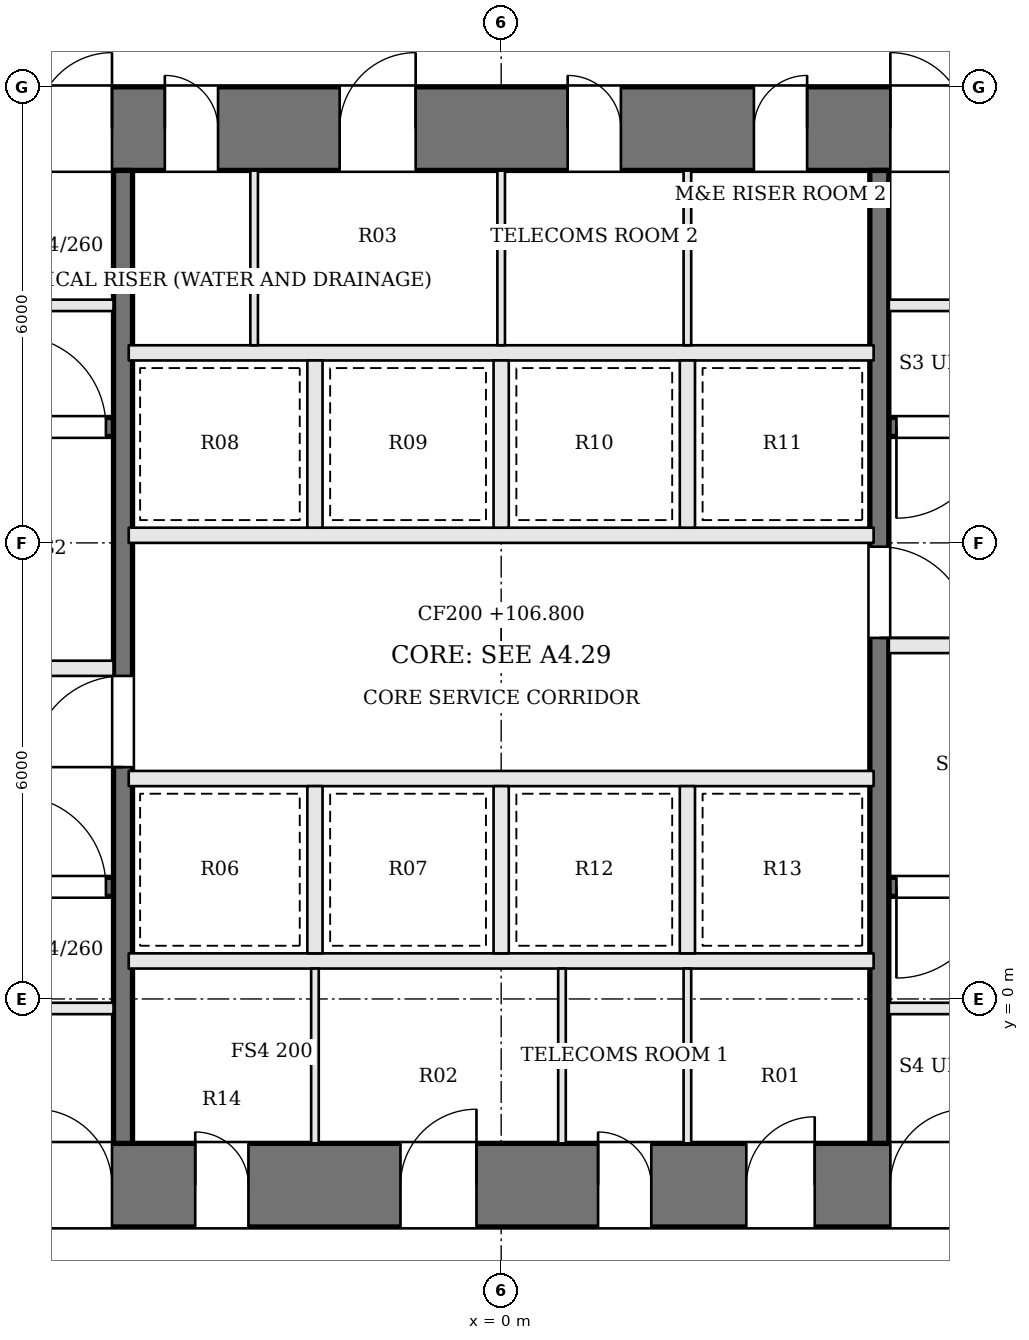
"""IFC4 building model, lengths in metres.
Left out: names, types, materials, properties, quantities, classifications, styles, units other than length and angle.
Written with IfcOpenShell. Run it as: python <this file> out.ifc"""

import sys

from ifc_helpers import new_model, si_unit, direction, frame, frame_2d, origin, place, context, subcontext, project, spatial, rectangle, extrude, element, fill, save


model = new_model("IFC4")
c1 = context("Model", 3, precision=1e-05, world=origin(), true_north=direction((0.0, 1.0)))
c2 = subcontext(c1, "Body", "Model", "MODEL_VIEW")
j1 = project(units=[si_unit("LENGTHUNIT", "METRE"), si_unit("PLANEANGLEUNIT", "RADIAN")], contexts=[c1])
p1 = place(None, origin())
s1 = spatial("IfcSite", under=j1, at=p1, CompositionType="ELEMENT")
p2 = place(p1, origin())
s2 = spatial("IfcBuilding", under=s1, at=p2, CompositionType="ELEMENT")
p3 = place(p2, frame((0.0, 0.0, 106.8)))
s3 = spatial("IfcBuildingStorey", under=s2, at=p3, CompositionType="ELEMENT", Elevation=106.8)
p4 = place(p3, frame((-13.0, 11.45, 0.0), z_axis=(0.0, 0.0, 1.0), x_axis=(1.0, 0.0, 0.0)))
e1 = element("IfcWall", 1, at=p4, inside=s3, PredefinedType="SHEAR", context=c2, shape_type="SweptSolid", body=[
    extrude(rectangle(XDim=26.0, YDim=1.1, at=frame_2d((13.0, 0.0))), origin(), (0.0, 0.0, 1.0), 3.6),
])
p5 = place(p4, frame((8.575, 0.0, 0.0)))
e2 = element("IfcOpeningElement", 2, at=p5, cuts=e1, PredefinedType="OPENING", context=c2, shape_type="SweptSolid", body=[
    extrude(rectangle(XDim=0.7, YDim=2.1, at=frame_2d((0.35, 1.05))), frame((0.0, 0.56, 0.0), z_axis=(0.0, -1.0, 0.0), x_axis=(1.0, 0.0, 0.0)), (0.0, 0.0, 1.0), 1.12),
])
p6 = place(p4, frame((10.875, 0.0, 0.0)))
e3 = element("IfcOpeningElement", 3, at=p6, cuts=e1, PredefinedType="OPENING", context=c2, shape_type="SweptSolid", body=[
    extrude(rectangle(XDim=1.0, YDim=2.1, at=frame_2d((0.5, 1.05))), frame((0.0, 0.56, 0.0), z_axis=(0.0, -1.0, 0.0), x_axis=(1.0, 0.0, 0.0)), (0.0, 0.0, 1.0), 1.12),
])
p7 = place(p4, frame((13.875, 0.0, 0.0)))
e4 = element("IfcOpeningElement", 4, at=p7, cuts=e1, PredefinedType="OPENING", context=c2, shape_type="SweptSolid", body=[
    extrude(rectangle(XDim=0.7, YDim=2.1, at=frame_2d((0.35, 1.05))), frame((0.0, 0.56, 0.0), z_axis=(0.0, -1.0, 0.0), x_axis=(1.0, 0.0, 0.0)), (0.0, 0.0, 1.0), 1.12),
])
p8 = place(p4, frame((16.325, 0.0, 0.0)))
e5 = element("IfcOpeningElement", 5, at=p8, cuts=e1, PredefinedType="OPENING", context=c2, shape_type="SweptSolid", body=[
    extrude(rectangle(XDim=0.7, YDim=2.1, at=frame_2d((0.35, 1.05))), frame((0.0, 0.56, 0.0), z_axis=(0.0, -1.0, 0.0), x_axis=(1.0, 0.0, 0.0)), (0.0, 0.0, 1.0), 1.12),
])
p9 = place(p4, frame((6.88, 0.0, 0.0)))
e6 = element("IfcOpeningElement", 6, at=p9, cuts=e1, PredefinedType="OPENING", context=c2, shape_type="SweptSolid", body=[
    extrude(rectangle(XDim=1.0, YDim=2.1, at=frame_2d((0.5, 1.05))), frame((0.0, 0.56, 0.0), z_axis=(0.0, -1.0, 0.0), x_axis=(1.0, 0.0, 0.0)), (0.0, 0.0, 1.0), 1.12),
])
p10 = place(p4, frame((18.12, 0.0, 0.0)))
e7 = element("IfcOpeningElement", 7, at=p10, cuts=e1, PredefinedType="OPENING", context=c2, shape_type="SweptSolid", body=[
    extrude(rectangle(XDim=1.0, YDim=2.1, at=frame_2d((0.5, 1.05))), frame((0.0, 0.56, 0.0), z_axis=(0.0, -1.0, 0.0), x_axis=(1.0, 0.0, 0.0)), (0.0, 0.0, 1.0), 1.12),
])
p11 = place(p3, frame((-13.0, -2.45, 0.0), z_axis=(0.0, 0.0, 1.0), x_axis=(1.0, 0.0, 0.0)))
e8 = element("IfcWall", 8, at=p11, inside=s3, PredefinedType="SHEAR", context=c2, shape_type="SweptSolid", body=[
    extrude(rectangle(XDim=26.0, YDim=1.1, at=frame_2d((13.0, 0.0))), origin(), (0.0, 0.0, 1.0), 3.6),
])
p12 = place(p11, frame((8.975, 0.0, 0.0)))
e9 = element("IfcOpeningElement", 9, at=p12, cuts=e8, PredefinedType="OPENING", context=c2, shape_type="SweptSolid", body=[
    extrude(rectangle(XDim=0.7, YDim=2.1, at=frame_2d((0.35, 1.05))), frame((0.0, 0.56, 0.0), z_axis=(0.0, -1.0, 0.0), x_axis=(1.0, 0.0, 0.0)), (0.0, 0.0, 1.0), 1.12),
])
p13 = place(p11, frame((11.675, 0.0, 0.0)))
e10 = element("IfcOpeningElement", 10, at=p13, cuts=e8, PredefinedType="OPENING", context=c2, shape_type="SweptSolid", body=[
    extrude(rectangle(XDim=1.0, YDim=2.1, at=frame_2d((0.5, 1.05))), frame((0.0, 0.56, 0.0), z_axis=(0.0, -1.0, 0.0), x_axis=(1.0, 0.0, 0.0)), (0.0, 0.0, 1.0), 1.12),
])
p14 = place(p11, frame((14.275, 0.0, 0.0)))
e11 = element("IfcOpeningElement", 11, at=p14, cuts=e8, PredefinedType="OPENING", context=c2, shape_type="SweptSolid", body=[
    extrude(rectangle(XDim=0.7, YDim=2.1, at=frame_2d((0.35, 1.05))), frame((0.0, 0.56, 0.0), z_axis=(0.0, -1.0, 0.0), x_axis=(1.0, 0.0, 0.0)), (0.0, 0.0, 1.0), 1.12),
])
p15 = place(p11, frame((16.225, 0.0, 0.0)))
e12 = element("IfcOpeningElement", 12, at=p15, cuts=e8, PredefinedType="OPENING", context=c2, shape_type="SweptSolid", body=[
    extrude(rectangle(XDim=0.9, YDim=2.1, at=frame_2d((0.45, 1.05))), frame((0.0, 0.56, 0.0), z_axis=(0.0, -1.0, 0.0), x_axis=(1.0, 0.0, 0.0)), (0.0, 0.0, 1.0), 1.12),
])
p16 = place(p11, frame((6.88, 0.0, 0.0)))
e13 = element("IfcOpeningElement", 13, at=p16, cuts=e8, PredefinedType="OPENING", context=c2, shape_type="SweptSolid", body=[
    extrude(rectangle(XDim=1.0, YDim=2.1, at=frame_2d((0.5, 1.05))), frame((0.0, 0.56, 0.0), z_axis=(0.0, -1.0, 0.0), x_axis=(1.0, 0.0, 0.0)), (0.0, 0.0, 1.0), 1.12),
])
p17 = place(p11, frame((18.12, 0.0, 0.0)))
e14 = element("IfcOpeningElement", 14, at=p17, cuts=e8, PredefinedType="OPENING", context=c2, shape_type="SweptSolid", body=[
    extrude(rectangle(XDim=1.0, YDim=2.1, at=frame_2d((0.5, 1.05))), frame((0.0, 0.56, 0.0), z_axis=(0.0, -1.0, 0.0), x_axis=(1.0, 0.0, 0.0)), (0.0, 0.0, 1.0), 1.12),
])
for number, where, z_axis, x_axis in (
    (15, (-6.4, -0.125, 0.0), (0.0, 0.0, 1.0), (1.0, 0.0, 0.0)),
    (16, (6.4, 9.125, 0.0), (0.0, 0.0, 1.0), (-1.0, 0.0, 0.0)),
    (17, (-6.4, 9.125, 0.0), (0.0, 0.0, 1.0), (1.0, 0.0, 0.0)),
    (18, (6.4, -0.125, 0.0), (0.0, 0.0, 1.0), (-1.0, 0.0, 0.0)),
):
    element("IfcWall", number, at=place(p3, frame(where, z_axis=z_axis, x_axis=x_axis)), inside=s3, PredefinedType="SOLIDWALL", context=c2, shape_type="SweptSolid", body=[
        extrude(rectangle(XDim=1.3, YDim=0.15, at=frame_2d((0.65, 0.0))), origin(), (0.0, 0.0, 1.0), 3.4),
    ])
p18 = place(p3, frame((-11.9, 1.475, 0.0), z_axis=(0.0, 0.0, 1.0), x_axis=(1.0, 0.0, 0.0)))
e19 = element("IfcWall", 19, at=p18, inside=s3, PredefinedType="SOLIDWALL", context=c2, shape_type="SweptSolid", body=[
    extrude(rectangle(XDim=6.8, YDim=0.25, at=frame_2d((3.4, 0.0))), origin(), (0.0, 0.0, 1.0), 3.4),
])
p19 = place(p18, frame((5.5, 0.0, 0.0)))
e20 = element("IfcOpeningElement", 20, at=p19, cuts=e19, PredefinedType="OPENING", context=c2, shape_type="SweptSolid", body=[
    extrude(rectangle(XDim=1.2, YDim=2.1, at=frame_2d((0.6, 1.05))), frame((0.0, 0.135, 0.0), z_axis=(0.0, -1.0, 0.0), x_axis=(1.0, 0.0, 0.0)), (0.0, 0.0, 1.0), 0.27),
])
p20 = place(p3, frame((11.9, 7.525, 0.0), z_axis=(0.0, 0.0, 1.0), x_axis=(-1.0, 0.0, 0.0)))
e21 = element("IfcWall", 21, at=p20, inside=s3, PredefinedType="SOLIDWALL", context=c2, shape_type="SweptSolid", body=[
    extrude(rectangle(XDim=6.8, YDim=0.25, at=frame_2d((3.4, 0.0))), origin(), (0.0, 0.0, 1.0), 3.4),
])
p21 = place(p20, frame((5.5, 0.0, 0.0)))
e22 = element("IfcOpeningElement", 22, at=p21, cuts=e21, PredefinedType="OPENING", context=c2, shape_type="SweptSolid", body=[
    extrude(rectangle(XDim=1.2, YDim=2.1, at=frame_2d((0.6, 1.05))), frame((0.0, 0.135, 0.0), z_axis=(0.0, -1.0, 0.0), x_axis=(1.0, 0.0, 0.0)), (0.0, 0.0, 1.0), 0.27),
])
p22 = place(p3, frame((-11.9, 4.35, 0.0), z_axis=(0.0, 0.0, 1.0), x_axis=(1.0, 0.0, 0.0)))
e23 = element("IfcWall", 23, at=p22, inside=s3, PredefinedType="SOLIDWALL", context=c2, shape_type="SweptSolid", body=[
    extrude(rectangle(XDim=6.8, YDim=0.2, at=frame_2d((3.4, 0.0))), origin(), (0.0, 0.0, 1.0), 3.4),
])
p23 = place(p22, frame((4.1, 0.0, 0.0)))
e24 = element("IfcOpeningElement", 24, at=p23, cuts=e23, PredefinedType="OPENING", context=c2, shape_type="SweptSolid", body=[
    extrude(rectangle(XDim=1.2, YDim=2.1, at=frame_2d((0.6, 1.05))), frame((0.0, 0.11, 0.0), z_axis=(0.0, -1.0, 0.0), x_axis=(1.0, 0.0, 0.0)), (0.0, 0.0, 1.0), 0.22),
])
p24 = place(p22, frame((0.8, 0.0, 0.0)))
e25 = element("IfcOpeningElement", 25, at=p24, cuts=e23, PredefinedType="OPENING", context=c2, shape_type="SweptSolid", body=[
    extrude(rectangle(XDim=1.2, YDim=2.1, at=frame_2d((0.6, 1.05))), frame((0.0, 0.11, 0.0), z_axis=(0.0, -1.0, 0.0), x_axis=(1.0, 0.0, 0.0)), (0.0, 0.0, 1.0), 0.22),
])
p25 = place(p3, frame((11.9, 4.65, 0.0), z_axis=(0.0, 0.0, 1.0), x_axis=(-1.0, 0.0, 0.0)))
e26 = element("IfcWall", 26, at=p25, inside=s3, PredefinedType="SOLIDWALL", context=c2, shape_type="SweptSolid", body=[
    extrude(rectangle(XDim=6.8, YDim=0.2, at=frame_2d((3.4, 0.0))), origin(), (0.0, 0.0, 1.0), 3.4),
])
p26 = place(p25, frame((4.1, 0.0, 0.0)))
e27 = element("IfcOpeningElement", 27, at=p26, cuts=e26, PredefinedType="OPENING", context=c2, shape_type="SweptSolid", body=[
    extrude(rectangle(XDim=1.2, YDim=2.1, at=frame_2d((0.6, 1.05))), frame((0.0, 0.11, 0.0), z_axis=(0.0, -1.0, 0.0), x_axis=(1.0, 0.0, 0.0)), (0.0, 0.0, 1.0), 0.22),
])
p27 = place(p25, frame((0.8, 0.0, 0.0)))
e28 = element("IfcOpeningElement", 28, at=p27, cuts=e26, PredefinedType="OPENING", context=c2, shape_type="SweptSolid", body=[
    extrude(rectangle(XDim=1.2, YDim=2.1, at=frame_2d((0.6, 1.05))), frame((0.0, 0.11, 0.0), z_axis=(0.0, -1.0, 0.0), x_axis=(1.0, 0.0, 0.0)), (0.0, 0.0, 1.0), 0.22),
])
p28 = place(p3, frame((-11.9, 7.525, 0.0), z_axis=(0.0, 0.0, 1.0), x_axis=(1.0, 0.0, 0.0)))
e29 = element("IfcWall", 29, at=p28, inside=s3, PredefinedType="SOLIDWALL", context=c2, shape_type="SweptSolid", body=[
    extrude(rectangle(XDim=6.8, YDim=0.25, at=frame_2d((3.4, 0.0))), origin(), (0.0, 0.0, 1.0), 3.4),
])
p29 = place(p28, frame((5.5, 0.0, 0.0)))
e30 = element("IfcOpeningElement", 30, at=p29, cuts=e29, PredefinedType="OPENING", context=c2, shape_type="SweptSolid", body=[
    extrude(rectangle(XDim=1.2, YDim=2.1, at=frame_2d((0.6, 1.05))), frame((0.0, 0.135, 0.0), z_axis=(0.0, -1.0, 0.0), x_axis=(1.0, 0.0, 0.0)), (0.0, 0.0, 1.0), 0.27),
])
p30 = place(p3, frame((11.9, 1.475, 0.0), z_axis=(0.0, 0.0, 1.0), x_axis=(-1.0, 0.0, 0.0)))
e31 = element("IfcWall", 31, at=p30, inside=s3, PredefinedType="SOLIDWALL", context=c2, shape_type="SweptSolid", body=[
    extrude(rectangle(XDim=6.8, YDim=0.25, at=frame_2d((3.4, 0.0))), origin(), (0.0, 0.0, 1.0), 3.4),
])
p31 = place(p30, frame((5.5, 0.0, 0.0)))
e32 = element("IfcOpeningElement", 32, at=p31, cuts=e31, PredefinedType="OPENING", context=c2, shape_type="SweptSolid", body=[
    extrude(rectangle(XDim=1.2, YDim=2.1, at=frame_2d((0.6, 1.05))), frame((0.0, 0.135, 0.0), z_axis=(0.0, -1.0, 0.0), x_axis=(1.0, 0.0, 0.0)), (0.0, 0.0, 1.0), 0.27),
])
p32 = place(p3, frame((-4.975, -1.9, 0.0), z_axis=(0.0, 0.0, 1.0), x_axis=(0.0, 1.0, 0.0)))
e33 = element("IfcWall", 33, at=p32, inside=s3, PredefinedType="SOLIDWALL", context=c2, shape_type="SweptSolid", body=[
    extrude(rectangle(XDim=12.8, YDim=0.25, at=frame_2d((6.4, 0.0))), origin(), (0.0, 0.0, 1.0), 3.4),
])
p33 = place(p32, frame((4.95, 0.0, 0.0)))
e34 = element("IfcOpeningElement", 34, at=p33, cuts=e33, PredefinedType="OPENING", context=c2, shape_type="SweptSolid", body=[
    extrude(rectangle(XDim=1.2, YDim=2.1, at=frame_2d((0.6, 1.05))), frame((0.0, 0.135, 0.0), z_axis=(0.0, -1.0, 0.0), x_axis=(1.0, 0.0, 0.0)), (0.0, 0.0, 1.0), 0.27),
])
p34 = place(p3, frame((4.975, 10.9, 0.0), z_axis=(0.0, 0.0, 1.0), x_axis=(0.0, -1.0, 0.0)))
e35 = element("IfcWall", 35, at=p34, inside=s3, PredefinedType="SOLIDWALL", context=c2, shape_type="SweptSolid", body=[
    extrude(rectangle(XDim=12.8, YDim=0.25, at=frame_2d((6.4, 0.0))), origin(), (0.0, 0.0, 1.0), 3.4),
])
p35 = place(p34, frame((4.95, 0.0, 0.0)))
e36 = element("IfcOpeningElement", 36, at=p35, cuts=e35, PredefinedType="OPENING", context=c2, shape_type="SweptSolid", body=[
    extrude(rectangle(XDim=1.2, YDim=2.1, at=frame_2d((0.6, 1.05))), frame((0.0, 0.135, 0.0), z_axis=(0.0, -1.0, 0.0), x_axis=(1.0, 0.0, 0.0)), (0.0, 0.0, 1.0), 0.27),
])
for number, where, z_axis, x_axis in (
    (37, (-4.9, 0.5, 0.0), (0.0, 0.0, 1.0), (1.0, 0.0, 0.0)),
    (38, (-4.9, 2.9, 0.0), (0.0, 0.0, 1.0), (1.0, 0.0, 0.0)),
    (39, (-4.9, 6.1, 0.0), (0.0, 0.0, 1.0), (1.0, 0.0, 0.0)),
    (40, (-4.9, 8.5, 0.0), (0.0, 0.0, 1.0), (1.0, 0.0, 0.0)),
):
    element("IfcWall", number, at=place(p3, frame(where, z_axis=z_axis, x_axis=x_axis)), inside=s3, PredefinedType="SOLIDWALL", context=c2, shape_type="SweptSolid", body=[
        extrude(rectangle(XDim=9.8, YDim=0.2, at=frame_2d((4.9, 0.0))), origin(), (0.0, 0.0, 1.0), 3.4),
    ])
for number, where, z_axis, x_axis in (
    (41, (-2.45, 0.6, 0.0), (0.0, 0.0, 1.0), (0.0, 1.0, 0.0)),
    (42, (0.0, 0.6, 0.0), (0.0, 0.0, 1.0), (0.0, 1.0, 0.0)),
    (43, (2.45, 0.6, 0.0), (0.0, 0.0, 1.0), (0.0, 1.0, 0.0)),
    (44, (-2.45, 6.2, 0.0), (0.0, 0.0, 1.0), (0.0, 1.0, 0.0)),
    (45, (0.0, 6.2, 0.0), (0.0, 0.0, 1.0), (0.0, 1.0, 0.0)),
    (46, (2.45, 6.2, 0.0), (0.0, 0.0, 1.0), (0.0, 1.0, 0.0)),
):
    element("IfcWall", number, at=place(p3, frame(where, z_axis=z_axis, x_axis=x_axis)), inside=s3, PredefinedType="SOLIDWALL", context=c2, shape_type="SweptSolid", body=[
        extrude(rectangle(XDim=2.2, YDim=0.2, at=frame_2d((1.1, 0.0))), origin(), (0.0, 0.0, 1.0), 3.4),
    ])
for number, where, z_axis, x_axis in (
    (47, (-2.45, -1.9, 0.0), (0.0, 0.0, 1.0), (0.0, 1.0, 0.0)),
    (48, (0.8, -1.9, 0.0), (0.0, 0.0, 1.0), (0.0, 1.0, 0.0)),
    (49, (2.45, -1.9, 0.0), (0.0, 0.0, 1.0), (0.0, 1.0, 0.0)),
    (50, (-3.25, 8.6, 0.0), (0.0, 0.0, 1.0), (0.0, 1.0, 0.0)),
    (51, (0.0, 8.6, 0.0), (0.0, 0.0, 1.0), (0.0, 1.0, 0.0)),
    (52, (2.45, 8.6, 0.0), (0.0, 0.0, 1.0), (0.0, 1.0, 0.0)),
):
    element("IfcWall", number, at=place(p3, frame(where, z_axis=z_axis, x_axis=x_axis)), inside=s3, PredefinedType="PARTITIONING", context=c2, shape_type="SweptSolid", body=[
        extrude(rectangle(XDim=2.3, YDim=0.1, at=frame_2d((1.15, 0.0))), origin(), (0.0, 0.0, 1.0), 3.4),
    ])
p36 = place(p33, origin())
e53 = element("IfcDoor", 53, at=p36, inside=s3, OperationType="SINGLE_SWING_LEFT", PredefinedType="DOOR", context=c2, shape_type="SweptSolid", body=[
    extrude(rectangle(XDim=1.2, YDim=2.1, at=frame_2d((0.6, 1.05))), frame((0.0, 0.025, 0.0), z_axis=(0.0, -1.0, 0.0), x_axis=(1.0, 0.0, 0.0)), (0.0, 0.0, 1.0), 0.05),
])
fill(e34, e53)
p37 = place(p35, origin())
e54 = element("IfcDoor", 54, at=p37, inside=s3, OperationType="SINGLE_SWING_RIGHT", PredefinedType="DOOR", context=c2, shape_type="SweptSolid", body=[
    extrude(rectangle(XDim=1.2, YDim=2.1, at=frame_2d((0.6, 1.05))), frame((0.0, 0.025, 0.0), z_axis=(0.0, -1.0, 0.0), x_axis=(1.0, 0.0, 0.0)), (0.0, 0.0, 1.0), 0.05),
])
fill(e36, e54)
p38 = place(p19, origin())
e55 = element("IfcDoor", 55, at=p38, inside=s3, OperationType="SINGLE_SWING_LEFT", PredefinedType="DOOR", context=c2, shape_type="SweptSolid", body=[
    extrude(rectangle(XDim=1.2, YDim=2.1, at=frame_2d((0.6, 1.05))), frame((0.0, 0.025, 0.0), z_axis=(0.0, -1.0, 0.0), x_axis=(1.0, 0.0, 0.0)), (0.0, 0.0, 1.0), 0.05),
])
fill(e20, e55)
p39 = place(p21, origin())
e56 = element("IfcDoor", 56, at=p39, inside=s3, OperationType="SINGLE_SWING_RIGHT", PredefinedType="DOOR", context=c2, shape_type="SweptSolid", body=[
    extrude(rectangle(XDim=1.2, YDim=2.1, at=frame_2d((0.6, 1.05))), frame((0.0, 0.025, 0.0), z_axis=(0.0, -1.0, 0.0), x_axis=(1.0, 0.0, 0.0)), (0.0, 0.0, 1.0), 0.05),
])
fill(e22, e56)
p40 = place(p29, origin())
e57 = element("IfcDoor", 57, at=p40, inside=s3, OperationType="SINGLE_SWING_LEFT", PredefinedType="DOOR", context=c2, shape_type="SweptSolid", body=[
    extrude(rectangle(XDim=1.2, YDim=2.1, at=frame_2d((0.6, 1.05))), frame((0.0, 0.025, 0.0), z_axis=(0.0, -1.0, 0.0), x_axis=(1.0, 0.0, 0.0)), (0.0, 0.0, 1.0), 0.05),
])
fill(e30, e57)
p41 = place(p31, origin())
e58 = element("IfcDoor", 58, at=p41, inside=s3, OperationType="SINGLE_SWING_RIGHT", PredefinedType="DOOR", context=c2, shape_type="SweptSolid", body=[
    extrude(rectangle(XDim=1.2, YDim=2.1, at=frame_2d((0.6, 1.05))), frame((0.0, 0.025, 0.0), z_axis=(0.0, -1.0, 0.0), x_axis=(1.0, 0.0, 0.0)), (0.0, 0.0, 1.0), 0.05),
])
fill(e32, e58)
p42 = place(p12, origin())
e59 = element("IfcDoor", 59, at=p42, inside=s3, OperationType="SINGLE_SWING_LEFT", PredefinedType="DOOR", context=c2, shape_type="SweptSolid", body=[
    extrude(rectangle(XDim=0.7, YDim=2.1, at=frame_2d((0.35, 1.05))), frame((0.0, 0.025, 0.0), z_axis=(0.0, -1.0, 0.0), x_axis=(1.0, 0.0, 0.0)), (0.0, 0.0, 1.0), 0.05),
])
fill(e9, e59)
p43 = place(p13, origin())
e60 = element("IfcDoor", 60, at=p43, inside=s3, OperationType="SINGLE_SWING_RIGHT", PredefinedType="DOOR", context=c2, shape_type="SweptSolid", body=[
    extrude(rectangle(XDim=1.0, YDim=2.1, at=frame_2d((0.5, 1.05))), frame((0.0, 0.025, 0.0), z_axis=(0.0, -1.0, 0.0), x_axis=(1.0, 0.0, 0.0)), (0.0, 0.0, 1.0), 0.05),
])
fill(e10, e60)
p44 = place(p14, origin())
e61 = element("IfcDoor", 61, at=p44, inside=s3, OperationType="SINGLE_SWING_LEFT", PredefinedType="DOOR", context=c2, shape_type="SweptSolid", body=[
    extrude(rectangle(XDim=0.7, YDim=2.1, at=frame_2d((0.35, 1.05))), frame((0.0, 0.025, 0.0), z_axis=(0.0, -1.0, 0.0), x_axis=(1.0, 0.0, 0.0)), (0.0, 0.0, 1.0), 0.05),
])
fill(e11, e61)
p45 = place(p15, origin())
e62 = element("IfcDoor", 62, at=p45, inside=s3, OperationType="SINGLE_SWING_RIGHT", PredefinedType="DOOR", context=c2, shape_type="SweptSolid", body=[
    extrude(rectangle(XDim=0.9, YDim=2.1, at=frame_2d((0.45, 1.05))), frame((0.0, 0.025, 0.0), z_axis=(0.0, -1.0, 0.0), x_axis=(1.0, 0.0, 0.0)), (0.0, 0.0, 1.0), 0.05),
])
fill(e12, e62)
p46 = place(p5, origin())
e63 = element("IfcDoor", 63, at=p46, inside=s3, OperationType="SINGLE_SWING_LEFT", PredefinedType="DOOR", context=c2, shape_type="SweptSolid", body=[
    extrude(rectangle(XDim=0.7, YDim=2.1, at=frame_2d((0.35, 1.05))), frame((0.0, 0.025, 0.0), z_axis=(0.0, -1.0, 0.0), x_axis=(1.0, 0.0, 0.0)), (0.0, 0.0, 1.0), 0.05),
])
fill(e2, e63)
p47 = place(p6, origin())
e64 = element("IfcDoor", 64, at=p47, inside=s3, OperationType="SINGLE_SWING_RIGHT", PredefinedType="DOOR", context=c2, shape_type="SweptSolid", body=[
    extrude(rectangle(XDim=1.0, YDim=2.1, at=frame_2d((0.5, 1.05))), frame((0.0, 0.025, 0.0), z_axis=(0.0, -1.0, 0.0), x_axis=(1.0, 0.0, 0.0)), (0.0, 0.0, 1.0), 0.05),
])
fill(e3, e64)
p48 = place(p7, origin())
e65 = element("IfcDoor", 65, at=p48, inside=s3, OperationType="SINGLE_SWING_LEFT", PredefinedType="DOOR", context=c2, shape_type="SweptSolid", body=[
    extrude(rectangle(XDim=0.7, YDim=2.1, at=frame_2d((0.35, 1.05))), frame((0.0, 0.025, 0.0), z_axis=(0.0, -1.0, 0.0), x_axis=(1.0, 0.0, 0.0)), (0.0, 0.0, 1.0), 0.05),
])
fill(e4, e65)
p49 = place(p8, origin())
e66 = element("IfcDoor", 66, at=p49, inside=s3, OperationType="SINGLE_SWING_RIGHT", PredefinedType="DOOR", context=c2, shape_type="SweptSolid", body=[
    extrude(rectangle(XDim=0.7, YDim=2.1, at=frame_2d((0.35, 1.05))), frame((0.0, 0.025, 0.0), z_axis=(0.0, -1.0, 0.0), x_axis=(1.0, 0.0, 0.0)), (0.0, 0.0, 1.0), 0.05),
])
fill(e5, e66)
p50 = place(p16, origin())
e67 = element("IfcDoor", 67, at=p50, inside=s3, OperationType="SINGLE_SWING_LEFT", PredefinedType="DOOR", context=c2, shape_type="SweptSolid", body=[
    extrude(rectangle(XDim=1.0, YDim=2.1, at=frame_2d((0.5, 1.05))), frame((0.0, 0.025, 0.0), z_axis=(0.0, -1.0, 0.0), x_axis=(1.0, 0.0, 0.0)), (0.0, 0.0, 1.0), 0.05),
])
fill(e13, e67)
p51 = place(p9, origin())
e68 = element("IfcDoor", 68, at=p51, inside=s3, OperationType="SINGLE_SWING_RIGHT", PredefinedType="DOOR", context=c2, shape_type="SweptSolid", body=[
    extrude(rectangle(XDim=1.0, YDim=2.1, at=frame_2d((0.5, 1.05))), frame((0.0, 0.025, 0.0), z_axis=(0.0, -1.0, 0.0), x_axis=(1.0, 0.0, 0.0)), (0.0, 0.0, 1.0), 0.05),
])
fill(e6, e68)
p52 = place(p10, origin())
e69 = element("IfcDoor", 69, at=p52, inside=s3, OperationType="SINGLE_SWING_LEFT", PredefinedType="DOOR", context=c2, shape_type="SweptSolid", body=[
    extrude(rectangle(XDim=1.0, YDim=2.1, at=frame_2d((0.5, 1.05))), frame((0.0, 0.025, 0.0), z_axis=(0.0, -1.0, 0.0), x_axis=(1.0, 0.0, 0.0)), (0.0, 0.0, 1.0), 0.05),
])
fill(e7, e69)
p53 = place(p17, origin())
e70 = element("IfcDoor", 70, at=p53, inside=s3, OperationType="SINGLE_SWING_RIGHT", PredefinedType="DOOR", context=c2, shape_type="SweptSolid", body=[
    extrude(rectangle(XDim=1.0, YDim=2.1, at=frame_2d((0.5, 1.05))), frame((0.0, 0.025, 0.0), z_axis=(0.0, -1.0, 0.0), x_axis=(1.0, 0.0, 0.0)), (0.0, 0.0, 1.0), 0.05),
])
fill(e14, e70)
save(model, sys.argv[1])
